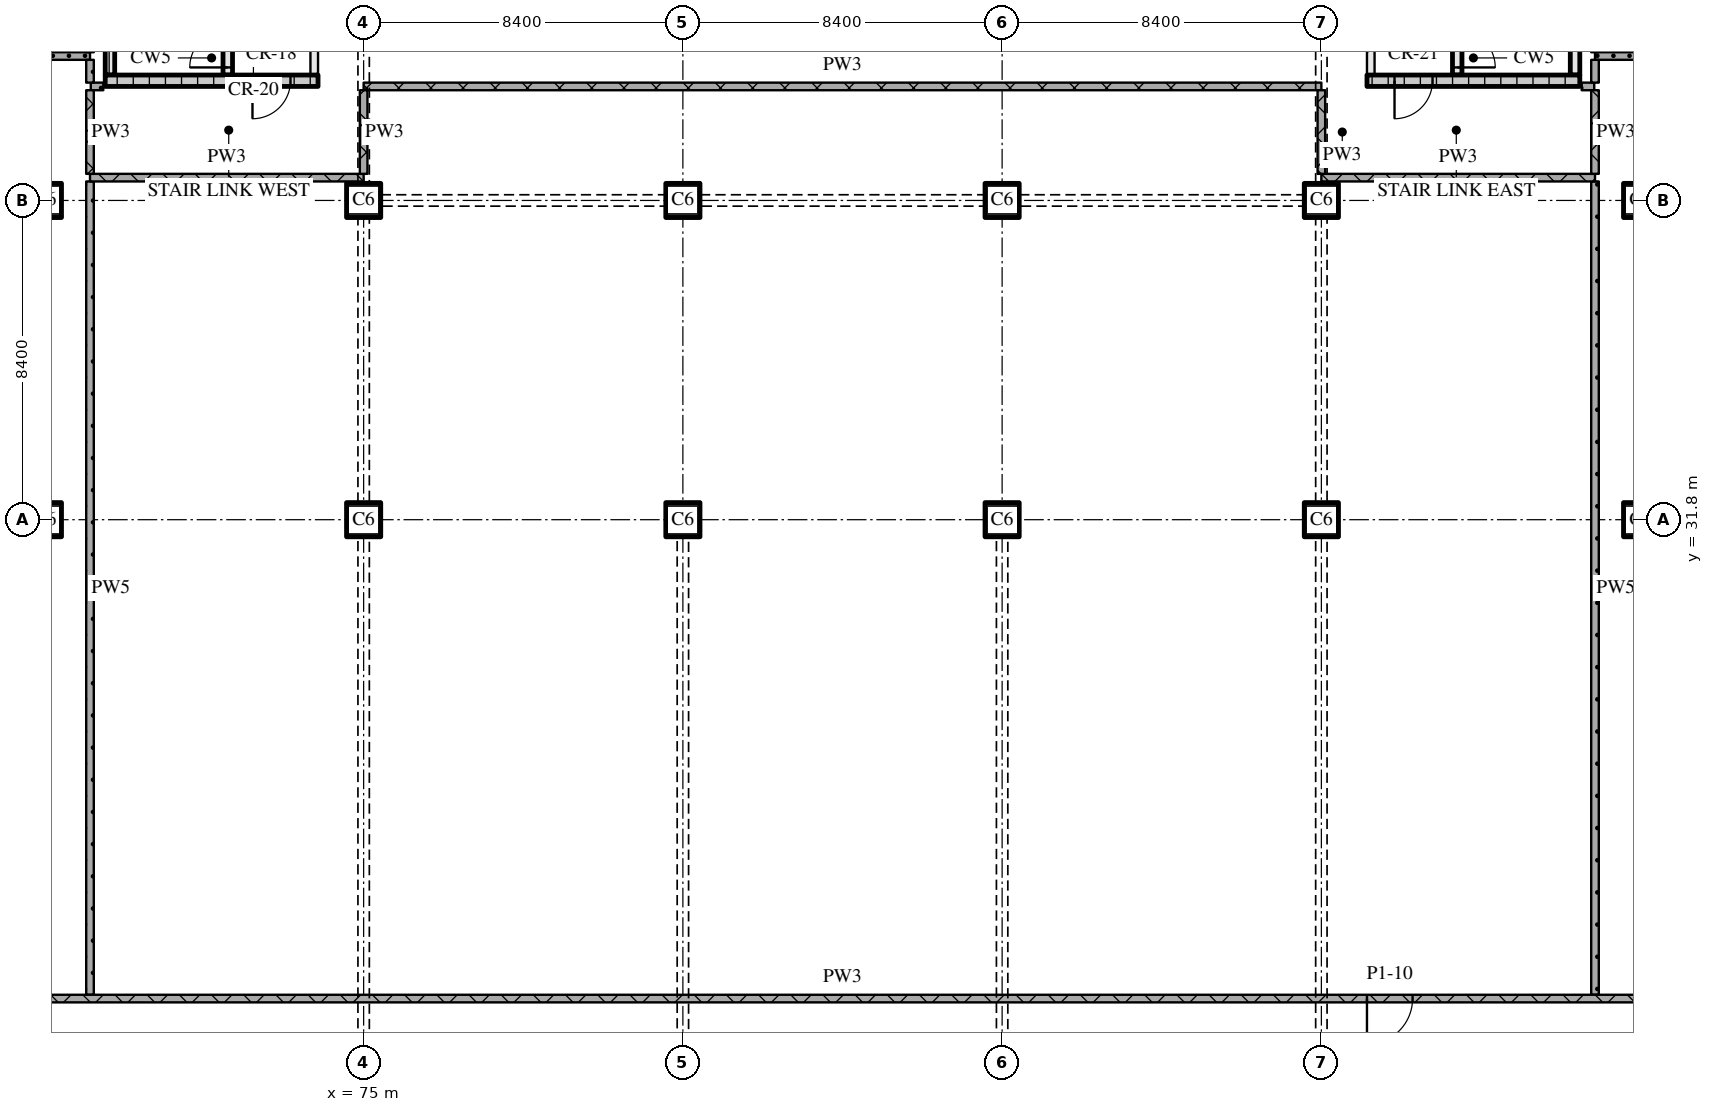
"""IFC4 building model, lengths in metres.
Left out: names, types, materials, properties, quantities, classifications, styles, units other than length and angle.
Written with IfcOpenShell. Run it as: python <this file> out.ifc"""

import sys

from ifc_helpers import new_model, si_unit, direction, frame, frame_2d, origin, origin_2d, place, context, subcontext, project, spatial, rectangle, extrude, element, fill, save


model = new_model("IFC4")
c1 = context("Model", 3, precision=1e-05, world=origin(), true_north=direction((0.0, 1.0)))
c2 = subcontext(c1, "Body", "Model", "MODEL_VIEW")
j1 = project(units=[si_unit("LENGTHUNIT", "METRE"), si_unit("PLANEANGLEUNIT", "RADIAN")], contexts=[c1])
p1 = place(None, origin())
s1 = spatial("IfcSite", under=j1, at=p1, CompositionType="ELEMENT")
p2 = place(p1, origin())
s2 = spatial("IfcBuilding", under=s1, at=p2, CompositionType="ELEMENT")
p3 = place(p2, frame((0.0, 0.0, 9.0)))
s3 = spatial("IfcBuildingStorey", under=s2, at=p3, CompositionType="ELEMENT", Elevation=9.0)
for number, where, z_axis, x_axis in (
    (1, (66.6, 31.8, 0.0), (0.0, 0.0, 1.0), (1.0, 0.0, 0.0)),
    (2, (66.6, 40.2, 0.0), (0.0, 0.0, 1.0), (1.0, 0.0, 0.0)),
    (3, (75.0, 31.8, 0.0), (0.0, 0.0, 1.0), (1.0, 0.0, 0.0)),
    (4, (75.0, 40.2, 0.0), (0.0, 0.0, 1.0), (1.0, 0.0, 0.0)),
    (5, (83.4, 31.8, 0.0), (0.0, 0.0, 1.0), (1.0, 0.0, 0.0)),
    (6, (83.4, 40.2, 0.0), (0.0, 0.0, 1.0), (1.0, 0.0, 0.0)),
    (7, (91.8, 31.8, 0.0), (0.0, 0.0, 1.0), (1.0, 0.0, 0.0)),
    (8, (91.8, 40.2, 0.0), (0.0, 0.0, 1.0), (1.0, 0.0, 0.0)),
    (9, (100.2, 31.8, 0.0), (0.0, 0.0, 1.0), (1.0, 0.0, 0.0)),
    (10, (100.2, 40.2, 0.0), (0.0, 0.0, 1.0), (1.0, 0.0, 0.0)),
    (11, (108.6, 31.8, 0.0), (0.0, 0.0, 1.0), (1.0, 0.0, 0.0)),
    (12, (108.6, 40.2, 0.0), (0.0, 0.0, 1.0), (1.0, 0.0, 0.0)),
):
    element("IfcColumn", number, at=place(p3, frame(where, z_axis=z_axis, x_axis=x_axis)), inside=s3, PredefinedType="COLUMN", context=c2, shape_type="SweptSolid", body=[
        extrude(rectangle(XDim=0.9, YDim=0.9, at=origin_2d()), origin(), (0.0, 0.0, 1.0), 5.4),
    ])
p4 = place(p3, frame((68.2, 43.35, 0.0), z_axis=(0.0, 0.0, 1.0), x_axis=(1.0, 0.0, 0.0)))
e13 = element("IfcWall", 13, at=p4, inside=s3, PredefinedType="SOLIDWALL", context=c2, shape_type="SweptSolid", body=[
    extrude(rectangle(XDim=5.6, YDim=0.3, at=frame_2d((2.8, 0.0))), origin(), (0.0, 0.0, 1.0), 5.1),
])
p5 = place(p4, frame((3.875, 0.0, 0.0)))
e14 = element("IfcOpeningElement", 14, at=p5, cuts=e13, PredefinedType="OPENING", context=c2, shape_type="SweptSolid", body=[
    extrude(rectangle(XDim=1.0, YDim=2.1, at=frame_2d((0.5, 1.05))), frame((0.0, 0.16, 0.0), z_axis=(0.0, -1.0, 0.0), x_axis=(1.0, 0.0, 0.0)), (0.0, 0.0, 1.0), 0.32),
])
p6 = place(p3, frame((68.325, 43.5, 0.0), z_axis=(0.0, 0.0, 1.0), x_axis=(0.0, 1.0, 0.0)))
e15 = element("IfcWall", 15, at=p6, inside=s3, PredefinedType="SOLIDWALL", context=c2, shape_type="SweptSolid", body=[
    extrude(rectangle(XDim=6.9, YDim=0.25, at=frame_2d((3.45, 0.0))), origin(), (0.0, 0.0, 1.0), 5.1),
])
p7 = place(p3, frame((71.425, 43.5, 0.0), z_axis=(0.0, 0.0, 1.0), x_axis=(0.0, 1.0, 0.0)))
e16 = element("IfcWall", 16, at=p7, inside=s3, PredefinedType="SOLIDWALL", context=c2, shape_type="SweptSolid", body=[
    extrude(rectangle(XDim=6.9, YDim=0.25, at=frame_2d((3.45, 0.0))), origin(), (0.0, 0.0, 1.0), 5.1),
])
p8 = place(p7, frame((0.2, 0.0, 0.0)))
e17 = element("IfcOpeningElement", 17, at=p8, cuts=e16, PredefinedType="OPENING", context=c2, shape_type="SweptSolid", body=[
    extrude(rectangle(XDim=1.0, YDim=2.1, at=frame_2d((0.5, 1.05))), frame((0.0, 0.135, 0.0), z_axis=(0.0, -1.0, 0.0), x_axis=(1.0, 0.0, 0.0)), (0.0, 0.0, 1.0), 0.27),
])
p9 = place(p3, frame((73.7, 43.5, 0.0), z_axis=(0.0, 0.0, 1.0), x_axis=(0.0, 1.0, 0.0)))
e18 = element("IfcWall", 18, at=p9, inside=s3, PredefinedType="PARTITIONING", context=c2, shape_type="SweptSolid", body=[
    extrude(rectangle(XDim=6.9, YDim=0.2, at=frame_2d((3.45, 0.0))), origin(), (0.0, 0.0, 1.0), 5.1),
])
p10 = place(p9, frame((1.0, 0.0, 0.0)))
e19 = element("IfcOpeningElement", 19, at=p10, cuts=e18, PredefinedType="OPENING", context=c2, shape_type="SweptSolid", body=[
    extrude(rectangle(XDim=1.0, YDim=2.1, at=frame_2d((0.5, 1.05))), frame((0.0, 0.11, 0.0), z_axis=(0.0, -1.0, 0.0), x_axis=(1.0, 0.0, 0.0)), (0.0, 0.0, 1.0), 0.22),
])
p11 = place(p3, frame((101.4, 43.35, 0.0), z_axis=(0.0, 0.0, 1.0), x_axis=(1.0, 0.0, 0.0)))
e20 = element("IfcWall", 20, at=p11, inside=s3, PredefinedType="SOLIDWALL", context=c2, shape_type="SweptSolid", body=[
    extrude(rectangle(XDim=5.6, YDim=0.3, at=frame_2d((2.8, 0.0))), origin(), (0.0, 0.0, 1.0), 5.1),
])
p12 = place(p11, frame((0.725, 0.0, 0.0)))
e21 = element("IfcOpeningElement", 21, at=p12, cuts=e20, PredefinedType="OPENING", context=c2, shape_type="SweptSolid", body=[
    extrude(rectangle(XDim=1.0, YDim=2.1, at=frame_2d((0.5, 1.05))), frame((0.0, 0.16, 0.0), z_axis=(0.0, -1.0, 0.0), x_axis=(1.0, 0.0, 0.0)), (0.0, 0.0, 1.0), 0.32),
])
p13 = place(p3, frame((101.5, 43.5, 0.0), z_axis=(0.0, 0.0, 1.0), x_axis=(0.0, 1.0, 0.0)))
e22 = element("IfcWall", 22, at=p13, inside=s3, PredefinedType="PARTITIONING", context=c2, shape_type="SweptSolid", body=[
    extrude(rectangle(XDim=6.9, YDim=0.2, at=frame_2d((3.45, 0.0))), origin(), (0.0, 0.0, 1.0), 5.1),
])
p14 = place(p13, frame((1.0, 0.0, 0.0)))
e23 = element("IfcOpeningElement", 23, at=p14, cuts=e22, PredefinedType="OPENING", context=c2, shape_type="SweptSolid", body=[
    extrude(rectangle(XDim=1.0, YDim=2.1, at=frame_2d((0.5, 1.05))), frame((0.0, 0.11, 0.0), z_axis=(0.0, -1.0, 0.0), x_axis=(1.0, 0.0, 0.0)), (0.0, 0.0, 1.0), 0.22),
])
p15 = place(p3, frame((103.775, 43.5, 0.0), z_axis=(0.0, 0.0, 1.0), x_axis=(0.0, 1.0, 0.0)))
e24 = element("IfcWall", 24, at=p15, inside=s3, PredefinedType="SOLIDWALL", context=c2, shape_type="SweptSolid", body=[
    extrude(rectangle(XDim=6.9, YDim=0.25, at=frame_2d((3.45, 0.0))), origin(), (0.0, 0.0, 1.0), 5.1),
])
p16 = place(p15, frame((0.2, 0.0, 0.0)))
e25 = element("IfcOpeningElement", 25, at=p16, cuts=e24, PredefinedType="OPENING", context=c2, shape_type="SweptSolid", body=[
    extrude(rectangle(XDim=1.0, YDim=2.1, at=frame_2d((0.5, 1.05))), frame((0.0, 0.135, 0.0), z_axis=(0.0, -1.0, 0.0), x_axis=(1.0, 0.0, 0.0)), (0.0, 0.0, 1.0), 0.27),
])
p17 = place(p3, frame((106.875, 43.5, 0.0), z_axis=(0.0, 0.0, 1.0), x_axis=(0.0, 1.0, 0.0)))
e26 = element("IfcWall", 26, at=p17, inside=s3, PredefinedType="SOLIDWALL", context=c2, shape_type="SweptSolid", body=[
    extrude(rectangle(XDim=6.9, YDim=0.25, at=frame_2d((3.45, 0.0))), origin(), (0.0, 0.0, 1.0), 5.1),
])
p18 = place(p3, frame((35.4, 19.2, 0.0), z_axis=(0.0, 0.0, 1.0), x_axis=(1.0, 0.0, 0.0)))
e27 = element("IfcWall", 27, at=p18, inside=s3, PredefinedType="PARTITIONING", context=c2, shape_type="SweptSolid", body=[
    extrude(rectangle(XDim=104.4, YDim=0.2, at=frame_2d((52.2, 0.0))), origin(), (0.0, 0.0, 1.0), 5.1),
])
p19 = place(p18, frame((66.0, 0.0, 0.0)))
e28 = element("IfcOpeningElement", 28, at=p19, cuts=e27, PredefinedType="OPENING", context=c2, shape_type="SweptSolid", body=[
    extrude(rectangle(XDim=1.2, YDim=2.1, at=frame_2d((0.6, 1.05))), frame((0.0, 0.11, 0.0), z_axis=(0.0, -1.0, 0.0), x_axis=(1.0, 0.0, 0.0)), (0.0, 0.0, 1.0), 0.22),
])
p20 = place(p18, frame((87.6, 0.0, 0.0)))
e29 = element("IfcOpeningElement", 29, at=p20, cuts=e27, PredefinedType="OPENING", context=c2, shape_type="SweptSolid", body=[
    extrude(rectangle(XDim=1.2, YDim=2.1, at=frame_2d((0.6, 1.05))), frame((0.0, 0.11, 0.0), z_axis=(0.0, -1.0, 0.0), x_axis=(1.0, 0.0, 0.0)), (0.0, 0.0, 1.0), 0.22),
])
for number, where, z_axis, x_axis in (
    (30, (67.8, 40.8, 0.0), (0.0, 0.0, 1.0), (1.0, 0.0, 0.0)),
    (31, (100.2, 40.8, 0.0), (0.0, 0.0, 1.0), (1.0, 0.0, 0.0)),
):
    element("IfcWall", number, at=place(p3, frame(where, z_axis=z_axis, x_axis=x_axis)), inside=s3, PredefinedType="PARTITIONING", context=c2, shape_type="SweptSolid", body=[
        extrude(rectangle(XDim=7.2, YDim=0.2, at=frame_2d((3.6, 0.0))), origin(), (0.0, 0.0, 1.0), 5.1),
    ])
p21 = place(p3, frame((75.0, 43.2, 0.0), z_axis=(0.0, 0.0, 1.0), x_axis=(1.0, 0.0, 0.0)))
e32 = element("IfcWall", 32, at=p21, inside=s3, PredefinedType="PARTITIONING", context=c2, shape_type="SweptSolid", body=[
    extrude(rectangle(XDim=25.2, YDim=0.2, at=frame_2d((12.6, 0.0))), origin(), (0.0, 0.0, 1.0), 5.1),
])
for number, where, z_axis, x_axis in (
    (33, (67.82, 43.2, 0.0), (0.0, 0.0, 1.0), (1.0, 0.0, 0.0)),
    (34, (107.05, 43.2, 0.0), (0.0, 0.0, 1.0), (1.0, 0.0, 0.0)),
):
    element("IfcWall", number, at=place(p3, frame(where, z_axis=z_axis, x_axis=x_axis)), inside=s3, PredefinedType="PARTITIONING", context=c2, shape_type="SweptSolid", body=[
        extrude(rectangle(XDim=0.33, YDim=0.2, at=frame_2d((0.165, 0.0))), origin(), (0.0, 0.0, 1.0), 5.1),
    ])
for number, where, z_axis, x_axis in (
    (35, (43.9, 44.0, 0.0), (0.0, 0.0, 1.0), (1.0, 0.0, 0.0)),
    (36, (107.4, 44.0, 0.0), (0.0, 0.0, 1.0), (1.0, 0.0, 0.0)),
):
    element("IfcWall", number, at=place(p3, frame(where, z_axis=z_axis, x_axis=x_axis)), inside=s3, PredefinedType="PARTITIONING", context=c2, shape_type="SweptSolid", body=[
        extrude(rectangle(XDim=23.9, YDim=0.2, at=frame_2d((11.95, 0.0))), origin(), (0.0, 0.0, 1.0), 5.1),
    ])
p22 = place(p3, frame((67.8, 43.1, 0.0), z_axis=(0.0, 0.0, 1.0), x_axis=(0.0, -1.0, 0.0)))
e37 = element("IfcWall", 37, at=p22, inside=s3, PredefinedType="PARTITIONING", context=c2, shape_type="SweptSolid", body=[
    extrude(rectangle(XDim=2.2, YDim=0.2, at=frame_2d((1.1, 0.0))), origin(), (0.0, 0.0, 1.0), 5.1),
])
p23 = place(p3, frame((67.8, 43.9, 0.0), z_axis=(0.0, 0.0, 1.0), x_axis=(0.0, -1.0, 0.0)))
e38 = element("IfcWall", 38, at=p23, inside=s3, PredefinedType="PARTITIONING", context=c2, shape_type="SweptSolid", body=[
    extrude(rectangle(XDim=0.6, YDim=0.2, at=frame_2d((0.3, 0.0))), origin(), (0.0, 0.0, 1.0), 5.1),
])
p24 = place(p3, frame((67.8, 40.7, 0.0), z_axis=(0.0, 0.0, 1.0), x_axis=(0.0, -1.0, 0.0)))
e39 = element("IfcWall", 39, at=p24, inside=s3, PredefinedType="PARTITIONING", context=c2, shape_type="SweptSolid", body=[
    extrude(rectangle(XDim=21.4, YDim=0.2, at=frame_2d((10.7, 0.0))), origin(), (0.0, 0.0, 1.0), 5.1),
])
for number, where, z_axis, x_axis in (
    (40, (75.0, 43.1, 0.0), (0.0, 0.0, 1.0), (0.0, -1.0, 0.0)),
    (41, (100.2, 43.1, 0.0), (0.0, 0.0, 1.0), (0.0, -1.0, 0.0)),
):
    element("IfcWall", number, at=place(p3, frame(where, z_axis=z_axis, x_axis=x_axis)), inside=s3, PredefinedType="PARTITIONING", context=c2, shape_type="SweptSolid", body=[
        extrude(rectangle(XDim=2.2, YDim=0.2, at=frame_2d((1.1, 0.0))), origin(), (0.0, 0.0, 1.0), 4.2),
    ])
p25 = place(p3, frame((107.4, 43.1, 0.0), z_axis=(0.0, 0.0, 1.0), x_axis=(0.0, -1.0, 0.0)))
e42 = element("IfcWall", 42, at=p25, inside=s3, PredefinedType="PARTITIONING", context=c2, shape_type="SweptSolid", body=[
    extrude(rectangle(XDim=2.2, YDim=0.2, at=frame_2d((1.1, 0.0))), origin(), (0.0, 0.0, 1.0), 5.1),
])
p26 = place(p3, frame((107.4, 43.9, 0.0), z_axis=(0.0, 0.0, 1.0), x_axis=(0.0, -1.0, 0.0)))
e43 = element("IfcWall", 43, at=p26, inside=s3, PredefinedType="PARTITIONING", context=c2, shape_type="SweptSolid", body=[
    extrude(rectangle(XDim=0.6, YDim=0.2, at=frame_2d((0.3, 0.0))), origin(), (0.0, 0.0, 1.0), 5.1),
])
p27 = place(p3, frame((107.4, 40.7, 0.0), z_axis=(0.0, 0.0, 1.0), x_axis=(0.0, -1.0, 0.0)))
e44 = element("IfcWall", 44, at=p27, inside=s3, PredefinedType="PARTITIONING", context=c2, shape_type="SweptSolid", body=[
    extrude(rectangle(XDim=21.4, YDim=0.2, at=frame_2d((10.7, 0.0))), origin(), (0.0, 0.0, 1.0), 5.1),
])
p28 = place(p5, origin())
e45 = element("IfcDoor", 45, at=p28, inside=s3, OperationType="SINGLE_SWING_RIGHT", PredefinedType="DOOR", context=c2, shape_type="SweptSolid", body=[
    extrude(rectangle(XDim=1.0, YDim=2.1, at=frame_2d((0.5, 1.05))), frame((0.0, 0.025, 0.0), z_axis=(0.0, -1.0, 0.0), x_axis=(1.0, 0.0, 0.0)), (0.0, 0.0, 1.0), 0.05),
])
fill(e14, e45)
p29 = place(p8, origin())
e46 = element("IfcDoor", 46, at=p29, inside=s3, OperationType="SINGLE_SWING_LEFT", PredefinedType="DOOR", context=c2, shape_type="SweptSolid", body=[
    extrude(rectangle(XDim=1.0, YDim=2.1, at=frame_2d((0.5, 1.05))), frame((0.0, 0.025, 0.0), z_axis=(0.0, -1.0, 0.0), x_axis=(1.0, 0.0, 0.0)), (0.0, 0.0, 1.0), 0.05),
])
fill(e17, e46)
p30 = place(p12, origin())
e47 = element("IfcDoor", 47, at=p30, inside=s3, OperationType="SINGLE_SWING_RIGHT", PredefinedType="DOOR", context=c2, shape_type="SweptSolid", body=[
    extrude(rectangle(XDim=1.0, YDim=2.1, at=frame_2d((0.5, 1.05))), frame((0.0, 0.025, 0.0), z_axis=(0.0, -1.0, 0.0), x_axis=(1.0, 0.0, 0.0)), (0.0, 0.0, 1.0), 0.05),
])
fill(e21, e47)
p31 = place(p16, origin())
e48 = element("IfcDoor", 48, at=p31, inside=s3, OperationType="SINGLE_SWING_RIGHT", PredefinedType="DOOR", context=c2, shape_type="SweptSolid", body=[
    extrude(rectangle(XDim=1.0, YDim=2.1, at=frame_2d((0.5, 1.05))), frame((0.0, 0.025, 0.0), z_axis=(0.0, -1.0, 0.0), x_axis=(1.0, 0.0, 0.0)), (0.0, 0.0, 1.0), 0.05),
])
fill(e25, e48)
p32 = place(p19, origin())
e49 = element("IfcDoor", 49, at=p32, inside=s3, OperationType="SINGLE_SWING_RIGHT", PredefinedType="DOOR", context=c2, shape_type="SweptSolid", body=[
    extrude(rectangle(XDim=1.2, YDim=2.1, at=frame_2d((0.6, 1.05))), frame((0.0, 0.025, 0.0), z_axis=(0.0, -1.0, 0.0), x_axis=(1.0, 0.0, 0.0)), (0.0, 0.0, 1.0), 0.05),
])
fill(e28, e49)
save(model, sys.argv[1])
